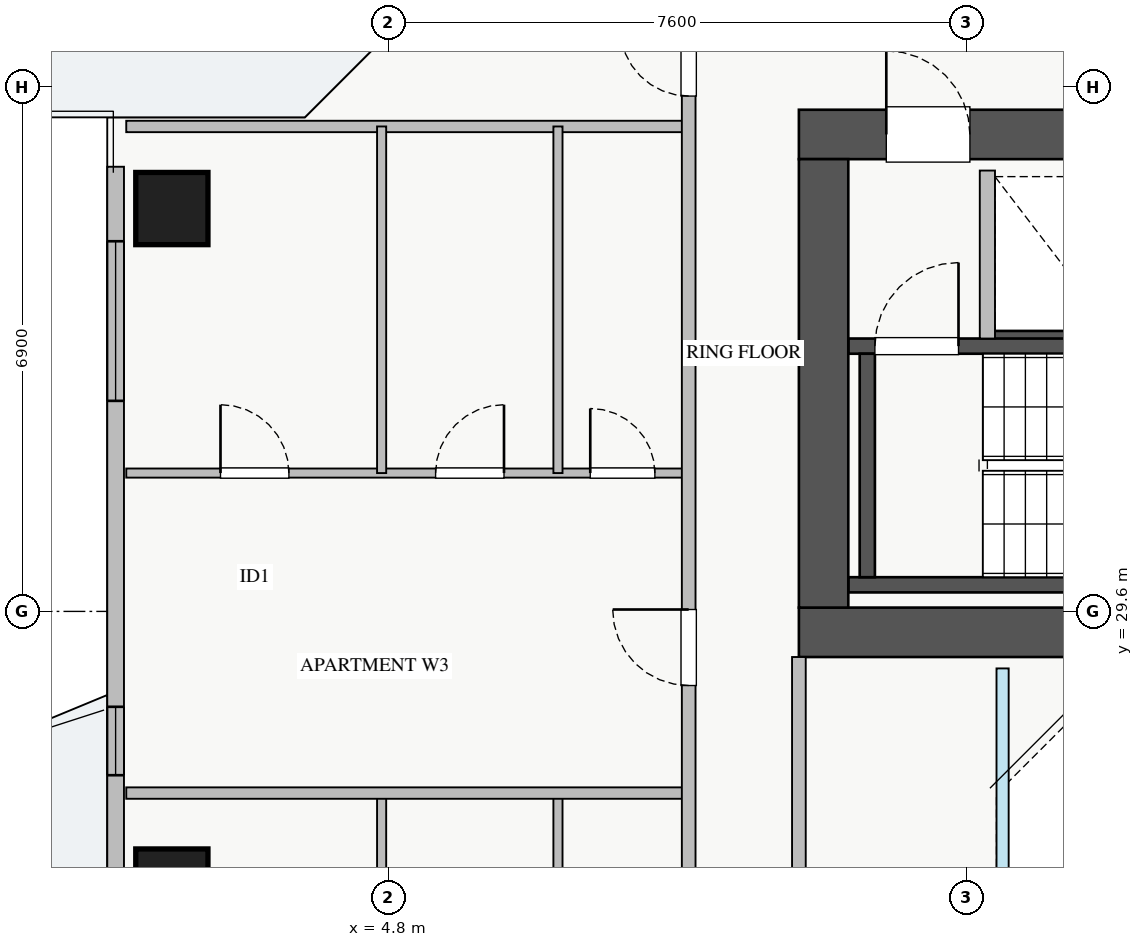
"""IFC4 building model, lengths in metres.
Left out: names, types, materials, properties, quantities, classifications, styles, units other than length and angle.
Written with IfcOpenShell. Run it as: python <this file> out.ifc"""

import sys

from ifc_helpers import new_model, si_unit, direction, frame, frame_2d, origin, origin_2d, place, context, subcontext, project, spatial, rectangle, extrude, source, transform, mapped, element, fill, save


model = new_model("IFC4")
c1 = context("Model", 3, precision=1e-05, world=origin(), true_north=direction((0.0, 1.0)))
c2 = subcontext(c1, "Body", "Model", "MODEL_VIEW")
j1 = project(units=[si_unit("LENGTHUNIT", "METRE"), si_unit("PLANEANGLEUNIT", "RADIAN")], contexts=[c1])
p1 = place(None, origin())
s1 = spatial("IfcSite", under=j1, at=p1, CompositionType="ELEMENT")
p2 = place(p1, origin())
s2 = spatial("IfcBuilding", under=s1, at=p2, CompositionType="ELEMENT")
p3 = place(p2, frame((0.0, 0.0, 143.75)))
s3 = spatial("IfcBuildingStorey", under=s2, at=p3, CompositionType="ELEMENT", Elevation=143.75)
p4 = place(p3, frame((12.68, 33.2, 0.0), z_axis=(0.0, 0.0, 1.0), x_axis=(1.0, 0.0, 0.0)))
e1 = element("IfcWall", 1, at=p4, inside=s3, PredefinedType="SHEAR", context=c2, shape_type="SweptSolid", body=[
    extrude(rectangle(XDim=1.94, YDim=0.18, at=frame_2d((0.97, 0.0))), origin(), (0.0, 0.0, 1.0), 3.07),
])
p5 = place(p3, frame((10.85, 29.95, 0.0), z_axis=(0.0, 0.0, 1.0), x_axis=(1.0, 0.0, 0.0)))
e2 = element("IfcWall", 2, at=p5, inside=s3, PredefinedType="SHEAR", context=c2, shape_type="SweptSolid", body=[
    extrude(rectangle(XDim=7.3, YDim=0.2, at=frame_2d((3.65, 0.0))), origin(), (0.0, 0.0, 1.0), 3.25),
])
p6 = place(p3, frame((10.85, 33.09, 0.0), z_axis=(0.0, 0.0, 1.0), x_axis=(1.0, 0.0, 0.0)))
e3 = element("IfcWall", 3, at=p6, inside=s3, PredefinedType="SHEAR", context=c2, shape_type="SweptSolid", body=[
    extrude(rectangle(XDim=7.3, YDim=0.2, at=frame_2d((3.65, 0.0))), origin(), (0.0, 0.0, 1.0), 3.25),
])
p7 = place(p6, frame((0.35, 0.0, 0.0)))
e4 = element("IfcOpeningElement", 4, at=p7, cuts=e3, PredefinedType="OPENING", context=c2, shape_type="SweptSolid", body=[
    extrude(rectangle(XDim=1.1, YDim=2.05, at=frame_2d((0.55, 1.025))), frame((0.0, 0.11, 0.0), z_axis=(0.0, -1.0, 0.0), x_axis=(1.0, 0.0, 0.0)), (0.0, 0.0, 1.0), 0.22),
])
p8 = place(p3, frame((11.1, 30.05, 0.0), z_axis=(0.0, 0.0, 1.0), x_axis=(0.0, 1.0, 0.0)))
e5 = element("IfcWall", 5, at=p8, inside=s3, PredefinedType="SHEAR", context=c2, shape_type="SweptSolid", body=[
    extrude(rectangle(XDim=2.94, YDim=0.2, at=frame_2d((1.47, 0.0))), origin(), (0.0, 0.0, 1.0), 3.25),
])
p9 = place(p3, frame((10.2, 29.325, 0.0), z_axis=(0.0, 0.0, 1.0), x_axis=(1.0, 0.0, 0.0)))
e6 = element("IfcWall", 6, at=p9, inside=s3, PredefinedType="SHEAR", context=c2, shape_type="SweptSolid", body=[
    extrude(rectangle(XDim=17.6, YDim=0.65, at=frame_2d((8.8, 0.0))), origin(), (0.0, 0.0, 1.0), 3.25),
])
p10 = place(p3, frame((10.2, 35.875, 0.0), z_axis=(0.0, 0.0, 1.0), x_axis=(1.0, 0.0, 0.0)))
e7 = element("IfcWall", 7, at=p10, inside=s3, PredefinedType="SHEAR", context=c2, shape_type="SweptSolid", body=[
    extrude(rectangle(XDim=17.6, YDim=0.65, at=frame_2d((8.8, 0.0))), origin(), (0.0, 0.0, 1.0), 3.25),
])
p11 = place(p10, frame((1.15, 0.0, 0.0)))
e8 = element("IfcOpeningElement", 8, at=p11, cuts=e7, PredefinedType="OPENING", context=c2, shape_type="SweptSolid", body=[
    extrude(rectangle(XDim=1.1, YDim=2.05, at=frame_2d((0.55, 1.025))), frame((0.0, 0.335, 0.0), z_axis=(0.0, -1.0, 0.0), x_axis=(1.0, 0.0, 0.0)), (0.0, 0.0, 1.0), 0.67),
])
p12 = place(p10, frame((8.3, 0.0, 0.0)))
e9 = element("IfcOpeningElement", 9, at=p12, cuts=e7, PredefinedType="OPENING", context=c2, shape_type="SweptSolid", body=[
    extrude(rectangle(XDim=1.1, YDim=2.05, at=frame_2d((0.55, 1.025))), frame((0.0, 0.335, 0.0), z_axis=(0.0, -1.0, 0.0), x_axis=(1.0, 0.0, 0.0)), (0.0, 0.0, 1.0), 0.67),
])
p13 = place(p10, frame((4.9, 0.0, 0.0)))
e10 = element("IfcOpeningElement", 10, at=p13, cuts=e7, PredefinedType="OPENING", context=c2, shape_type="SweptSolid", body=[
    extrude(rectangle(XDim=1.1, YDim=2.05, at=frame_2d((0.55, 1.025))), frame((0.0, 0.335, 0.0), z_axis=(0.0, -1.0, 0.0), x_axis=(1.0, 0.0, 0.0)), (0.0, 0.0, 1.0), 0.67),
])
p14 = place(p10, frame((14.74, 0.0, 0.0)))
e11 = element("IfcOpeningElement", 11, at=p14, cuts=e7, PredefinedType="OPENING", context=c2, shape_type="SweptSolid", body=[
    extrude(rectangle(XDim=1.0, YDim=2.05, at=frame_2d((0.5, 1.025))), frame((0.0, 0.335, 0.0), z_axis=(0.0, -1.0, 0.0), x_axis=(1.0, 0.0, 0.0)), (0.0, 0.0, 1.0), 0.67),
])
p15 = place(p10, frame((10.005, 0.0, 0.0)))
e12 = element("IfcOpeningElement", 12, at=p15, cuts=e7, PredefinedType="OPENING", context=c2, shape_type="SweptSolid", body=[
    extrude(rectangle(XDim=1.0, YDim=2.05, at=frame_2d((0.5, 1.025))), frame((0.0, 0.335, 0.0), z_axis=(0.0, -1.0, 0.0), x_axis=(1.0, 0.0, 0.0)), (0.0, 0.0, 1.0), 0.67),
])
p16 = place(p10, frame((11.55, 0.0, 0.0)))
e13 = element("IfcOpeningElement", 13, at=p16, cuts=e7, PredefinedType="OPENING", context=c2, shape_type="SweptSolid", body=[
    extrude(rectangle(XDim=1.0, YDim=2.05, at=frame_2d((0.5, 1.025))), frame((0.0, 0.335, 0.0), z_axis=(0.0, -1.0, 0.0), x_axis=(1.0, 0.0, 0.0)), (0.0, 0.0, 1.0), 0.67),
])
p17 = place(p10, frame((13.215, 0.0, 0.0)))
e14 = element("IfcOpeningElement", 14, at=p17, cuts=e7, PredefinedType="OPENING", context=c2, shape_type="SweptSolid", body=[
    extrude(rectangle(XDim=1.0, YDim=2.05, at=frame_2d((0.5, 1.025))), frame((0.0, 0.335, 0.0), z_axis=(0.0, -1.0, 0.0), x_axis=(1.0, 0.0, 0.0)), (0.0, 0.0, 1.0), 0.67),
])
p18 = place(p3, frame((10.525, 29.65, 0.0), z_axis=(0.0, 0.0, 1.0), x_axis=(0.0, 1.0, 0.0)))
e15 = element("IfcWall", 15, at=p18, inside=s3, PredefinedType="SHEAR", context=c2, shape_type="SweptSolid", body=[
    extrude(rectangle(XDim=5.9, YDim=0.65, at=frame_2d((2.95, 0.0))), origin(), (0.0, 0.0, 1.0), 3.25),
])
m1 = source(origin(), c2, "Body", "SweptSolid", [
    extrude(rectangle(XDim=0.95, YDim=0.95, at=origin_2d()), origin(), (0.0, 0.0, 1.0), 3.25),
])
for number, where, z_axis, x_axis in (
    (16, (1.95, 34.9, 0.0), (0.0, 0.0, 1.0), (1.0, 0.0, 0.0)),
    (17, (1.95, 26.0, 0.0), (0.0, 0.0, 1.0), (1.0, 0.0, 0.0)),
):
    element("IfcColumn", number, at=place(p3, frame(where, z_axis=z_axis, x_axis=x_axis)), inside=s3, PredefinedType="COLUMN", context=c2, shape_type="MappedRepresentation", body=[
        mapped(m1, transform((0.0, 0.0, 0.0), x_axis=(1.0, 0.0, 0.0), y_axis=(0.0, 1.0, 0.0), z_axis=(0.0, 0.0, 1.0), scale=1.0)),
    ])
p19 = place(p3, frame((1.21, 10.55, 0.0), z_axis=(0.0, 0.0, 1.0), x_axis=(0.0, 1.0, 0.0)))
e18 = element("IfcWall", 18, at=p19, inside=s3, PredefinedType="STANDARD", context=c2, shape_type="SweptSolid", body=[
    extrude(rectangle(XDim=24.9, YDim=0.22, at=frame_2d((12.45, 0.0))), origin(), (0.0, 0.0, 1.0), 2.61),
])
p20 = place(p19, frame((13.3, 0.0, 0.0)))
e19 = element("IfcOpeningElement", 19, at=p20, cuts=e18, PredefinedType="OPENING", context=c2, shape_type="SweptSolid", body=[
    extrude(rectangle(XDim=1.2, YDim=2.1, at=frame_2d((0.6, 1.05))), frame((0.0, 0.12, 0.0), z_axis=(0.0, -1.0, 0.0), x_axis=(1.0, 0.0, 0.0)), (0.0, 0.0, 1.0), 0.24),
])
p21 = place(p19, frame((1.912, 0.0, 0.9)))
e20 = element("IfcOpeningElement", 20, at=p21, cuts=e18, PredefinedType="OPENING", context=c2, shape_type="SweptSolid", body=[
    extrude(rectangle(XDim=2.4, YDim=1.48, at=frame_2d((1.2, 0.74))), frame((0.0, 0.12, 0.0), z_axis=(0.0, -1.0, 0.0), x_axis=(1.0, 0.0, 0.0)), (0.0, 0.0, 1.0), 0.24),
])
p22 = place(p19, frame((21.82, 0.0, 0.9)))
e21 = element("IfcOpeningElement", 21, at=p22, cuts=e18, PredefinedType="OPENING", context=c2, shape_type="SweptSolid", body=[
    extrude(rectangle(XDim=2.1, YDim=1.5, at=frame_2d((1.05, 0.75))), frame((0.0, 0.12, 0.0), z_axis=(0.0, -1.0, 0.0), x_axis=(1.0, 0.0, 0.0)), (0.0, 0.0, 1.0), 0.24),
])
p23 = place(p19, frame((12.05, 0.0, 0.9)))
e22 = element("IfcOpeningElement", 22, at=p23, cuts=e18, PredefinedType="OPENING", context=c2, shape_type="SweptSolid", body=[
    extrude(rectangle(XDim=0.9, YDim=1.2, at=frame_2d((0.45, 0.6))), frame((0.0, 0.12, 0.0), z_axis=(0.0, -1.0, 0.0), x_axis=(1.0, 0.0, 0.0)), (0.0, 0.0, 1.0), 0.24),
])
p24 = place(p19, frame((7.615, 0.0, 0.9)))
e23 = element("IfcOpeningElement", 23, at=p24, cuts=e18, PredefinedType="OPENING", context=c2, shape_type="SweptSolid", body=[
    extrude(rectangle(XDim=0.9, YDim=1.2, at=frame_2d((0.45, 0.6))), frame((0.0, 0.12, 0.0), z_axis=(0.0, -1.0, 0.0), x_axis=(1.0, 0.0, 0.0)), (0.0, 0.0, 1.0), 0.24),
])
p25 = place(p19, frame((16.895, 0.0, 0.9)))
e24 = element("IfcOpeningElement", 24, at=p25, cuts=e18, PredefinedType="OPENING", context=c2, shape_type="SweptSolid", body=[
    extrude(rectangle(XDim=0.9, YDim=1.2, at=frame_2d((0.45, 0.6))), frame((0.0, 0.12, 0.0), z_axis=(0.0, -1.0, 0.0), x_axis=(1.0, 0.0, 0.0)), (0.0, 0.0, 1.0), 0.24),
])
p26 = place(p3, frame((12.68, 33.19, 0.0), z_axis=(0.0, 0.0, 1.0), x_axis=(0.0, 1.0, 0.0)))
e25 = element("IfcWall", 25, at=p26, inside=s3, PredefinedType="PARTITIONING", context=c2, shape_type="SweptSolid", body=[
    extrude(rectangle(XDim=2.21, YDim=0.2, at=frame_2d((1.105, 0.0))), origin(), (0.0, 0.0, 1.0), 3.07),
])
p27 = place(p3, frame((1.35, 35.98, 0.0), z_axis=(0.0, 0.0, 1.0), x_axis=(1.0, 0.0, 0.0)))
e26 = element("IfcWall", 26, at=p27, inside=s3, PredefinedType="PARTITIONING", context=c2, shape_type="SweptSolid", body=[
    extrude(rectangle(XDim=7.4, YDim=0.15, at=frame_2d((3.7, 0.0))), origin(), (0.0, 0.0, 1.0), 3.07),
])
for number, where, z_axis, x_axis in (
    (27, (4.71, 22.38, 0.0), (0.0, 0.0, 1.0), (0.0, 1.0, 0.0)),
    (28, (7.03, 22.38, 0.0), (0.0, 0.0, 1.0), (0.0, 1.0, 0.0)),
):
    element("IfcWall", number, at=place(p3, frame(where, z_axis=z_axis, x_axis=x_axis)), inside=s3, PredefinedType="PLUMBINGWALL", context=c2, shape_type="SweptSolid", body=[
        extrude(rectangle(XDim=4.83, YDim=0.12, at=frame_2d((2.415, 0.0))), origin(), (0.0, 0.0, 1.0), 3.07),
    ])
p28 = place(p3, frame((1.35, 31.42, 0.0), z_axis=(0.0, 0.0, 1.0), x_axis=(1.0, 0.0, 0.0)))
e29 = element("IfcWall", 29, at=p28, inside=s3, PredefinedType="PLUMBINGWALL", context=c2, shape_type="SweptSolid", body=[
    extrude(rectangle(XDim=7.4, YDim=0.12, at=frame_2d((3.7, 0.0))), origin(), (0.0, 0.0, 1.0), 3.07),
])
p29 = place(p28, frame((1.24, 0.0, 0.0)))
e30 = element("IfcOpeningElement", 30, at=p29, cuts=e29, PredefinedType="OPENING", context=c2, shape_type="SweptSolid", body=[
    extrude(rectangle(XDim=0.9, YDim=2.05, at=frame_2d((0.45, 1.025))), frame((0.0, 0.07, 0.0), z_axis=(0.0, -1.0, 0.0), x_axis=(1.0, 0.0, 0.0)), (0.0, 0.0, 1.0), 0.14),
])
p30 = place(p28, frame((4.07, 0.0, 0.0)))
e31 = element("IfcOpeningElement", 31, at=p30, cuts=e29, PredefinedType="OPENING", context=c2, shape_type="SweptSolid", body=[
    extrude(rectangle(XDim=0.9, YDim=2.05, at=frame_2d((0.45, 1.025))), frame((0.0, 0.07, 0.0), z_axis=(0.0, -1.0, 0.0), x_axis=(1.0, 0.0, 0.0)), (0.0, 0.0, 1.0), 0.14),
])
p31 = place(p28, frame((6.105, 0.0, 0.0)))
e32 = element("IfcOpeningElement", 32, at=p31, cuts=e29, PredefinedType="OPENING", context=c2, shape_type="SweptSolid", body=[
    extrude(rectangle(XDim=0.85, YDim=2.05, at=frame_2d((0.425, 1.025))), frame((0.0, 0.07, 0.0), z_axis=(0.0, -1.0, 0.0), x_axis=(1.0, 0.0, 0.0)), (0.0, 0.0, 1.0), 0.14),
])
p32 = place(p3, frame((4.71, 31.42, 0.0), z_axis=(0.0, 0.0, 1.0), x_axis=(0.0, 1.0, 0.0)))
e33 = element("IfcWall", 33, at=p32, inside=s3, PredefinedType="PLUMBINGWALL", context=c2, shape_type="SweptSolid", body=[
    extrude(rectangle(XDim=4.56, YDim=0.12, at=frame_2d((2.28, 0.0))), origin(), (0.0, 0.0, 1.0), 3.07),
])
p33 = place(p3, frame((7.03, 31.42, 0.0), z_axis=(0.0, 0.0, 1.0), x_axis=(0.0, 1.0, 0.0)))
e34 = element("IfcWall", 34, at=p33, inside=s3, PredefinedType="PLUMBINGWALL", context=c2, shape_type="SweptSolid", body=[
    extrude(rectangle(XDim=4.56, YDim=0.12, at=frame_2d((2.28, 0.0))), origin(), (0.0, 0.0, 1.0), 2.577),
])
p34 = place(p3, frame((1.35, 27.21, 0.0), z_axis=(0.0, 0.0, 1.0), x_axis=(1.0, 0.0, 0.0)))
e35 = element("IfcWall", 35, at=p34, inside=s3, PredefinedType="PARTITIONING", context=c2, shape_type="SweptSolid", body=[
    extrude(rectangle(XDim=7.4, YDim=0.15, at=frame_2d((3.7, 0.0))), origin(), (0.0, 0.0, 1.0), 3.07),
])
p35 = place(p3, frame((8.75, 8.3, 0.0), z_axis=(0.0, 0.0, 1.0), x_axis=(0.0, 1.0, 0.0)))
e36 = element("IfcWall", 36, at=p35, inside=s3, PredefinedType="PARTITIONING", context=c2, shape_type="SweptSolid", body=[
    extrude(rectangle(XDim=29.4, YDim=0.18, at=frame_2d((14.7, 0.0))), origin(), (0.0, 0.0, 1.0), 3.07),
])
p36 = place(p35, frame((28.08, 0.0, 0.0)))
e37 = element("IfcOpeningElement", 37, at=p36, cuts=e36, PredefinedType="OPENING", context=c2, shape_type="SweptSolid", body=[
    extrude(rectangle(XDim=0.9, YDim=2.05, at=frame_2d((0.45, 1.025))), frame((0.0, 0.1, 0.0), z_axis=(0.0, -1.0, 0.0), x_axis=(1.0, 0.0, 0.0)), (0.0, 0.0, 1.0), 0.2),
])
p37 = place(p35, frame((0.245, 0.0, 0.0)))
e38 = element("IfcOpeningElement", 38, at=p37, cuts=e36, PredefinedType="OPENING", context=c2, shape_type="SweptSolid", body=[
    extrude(rectangle(XDim=0.9, YDim=2.05, at=frame_2d((0.45, 1.025))), frame((0.0, 0.1, 0.0), z_axis=(0.0, -1.0, 0.0), x_axis=(1.0, 0.0, 0.0)), (0.0, 0.0, 1.0), 0.2),
])
p38 = place(p35, frame((5.0, 0.0, 0.0)))
e39 = element("IfcOpeningElement", 39, at=p38, cuts=e36, PredefinedType="OPENING", context=c2, shape_type="SweptSolid", body=[
    extrude(rectangle(XDim=1.0, YDim=2.05, at=frame_2d((0.5, 1.025))), frame((0.0, 0.1, 0.0), z_axis=(0.0, -1.0, 0.0), x_axis=(1.0, 0.0, 0.0)), (0.0, 0.0, 1.0), 0.2),
])
p39 = place(p35, frame((11.165, 0.0, 0.0)))
e40 = element("IfcOpeningElement", 40, at=p39, cuts=e36, PredefinedType="OPENING", context=c2, shape_type="SweptSolid", body=[
    extrude(rectangle(XDim=1.0, YDim=2.05, at=frame_2d((0.5, 1.025))), frame((0.0, 0.1, 0.0), z_axis=(0.0, -1.0, 0.0), x_axis=(1.0, 0.0, 0.0)), (0.0, 0.0, 1.0), 0.2),
])
p40 = place(p35, frame((20.325, 0.0, 0.0)))
e41 = element("IfcOpeningElement", 41, at=p40, cuts=e36, PredefinedType="OPENING", context=c2, shape_type="SweptSolid", body=[
    extrude(rectangle(XDim=1.0, YDim=2.05, at=frame_2d((0.5, 1.025))), frame((0.0, 0.1, 0.0), z_axis=(0.0, -1.0, 0.0), x_axis=(1.0, 0.0, 0.0)), (0.0, 0.0, 1.0), 0.2),
])
p41 = place(p3, frame((10.2, 17.0, 0.0), z_axis=(0.0, 0.0, 1.0), x_axis=(0.0, 1.0, 0.0)))
e42 = element("IfcWall", 42, at=p41, inside=s3, PredefinedType="PARTITIONING", context=c2, shape_type="SweptSolid", body=[
    extrude(rectangle(XDim=12.0, YDim=0.18, at=frame_2d((6.0, 0.0))), origin(), (0.0, 0.0, 1.0), 3.07),
])
p42 = place(p41, frame((1.5, 0.0, 0.0)))
e43 = element("IfcOpeningElement", 43, at=p42, cuts=e42, PredefinedType="OPENING", context=c2, shape_type="SweptSolid", body=[
    extrude(rectangle(XDim=0.85, YDim=2.05, at=frame_2d((0.425, 1.025))), frame((0.0, 0.1, 0.0), z_axis=(0.0, -1.0, 0.0), x_axis=(1.0, 0.0, 0.0)), (0.0, 0.0, 1.0), 0.2),
])
p43 = place(p41, frame((6.5, 0.0, 0.0)))
e44 = element("IfcOpeningElement", 44, at=p43, cuts=e42, PredefinedType="OPENING", context=c2, shape_type="SweptSolid", body=[
    extrude(rectangle(XDim=1.0, YDim=2.05, at=frame_2d((0.5, 1.025))), frame((0.0, 0.1, 0.0), z_axis=(0.0, -1.0, 0.0), x_axis=(1.0, 0.0, 0.0)), (0.0, 0.0, 1.0), 0.2),
])
m2 = source(origin(), c2, "Body", "SweptSolid", [
    extrude(rectangle(XDim=2.1, YDim=1.5, at=frame_2d((1.05, 0.75))), frame((0.0, 0.03, 0.0), z_axis=(0.0, -1.0, 0.0), x_axis=(1.0, 0.0, 0.0)), (0.0, 0.0, 1.0), 0.06),
])
p44 = place(p22, origin())
e45 = element("IfcWindow", 45, at=p44, inside=s3, PartitioningType="TRIPLE_PANEL_VERTICAL", PredefinedType="WINDOW", context=c2, shape_type="MappedRepresentation", body=[
    mapped(m2, transform((0.0, 0.0, 0.0), x_axis=(1.0, 0.0, 0.0), y_axis=(0.0, 1.0, 0.0), z_axis=(0.0, 0.0, 1.0), scale=1.0)),
])
fill(e21, e45)
m3 = source(origin(), c2, "Body", "SweptSolid", [
    extrude(rectangle(XDim=1.1, YDim=2.05, at=frame_2d((0.55, 1.025))), frame((0.0, 0.025, 0.0), z_axis=(0.0, -1.0, 0.0), x_axis=(1.0, 0.0, 0.0)), (0.0, 0.0, 1.0), 0.05),
])
p45 = place(p11, origin())
e46 = element("IfcDoor", 46, at=p45, inside=s3, OperationType="SINGLE_SWING_LEFT", PredefinedType="DOOR", context=c2, shape_type="MappedRepresentation", body=[
    mapped(m3, transform((0.0, 0.0, 0.0), x_axis=(1.0, 0.0, 0.0), y_axis=(0.0, 1.0, 0.0), z_axis=(0.0, 0.0, 1.0), scale=1.0)),
])
fill(e8, e46)
p46 = place(p7, origin())
e47 = element("IfcDoor", 47, at=p46, inside=s3, OperationType="SINGLE_SWING_RIGHT", PredefinedType="DOOR", context=c2, shape_type="MappedRepresentation", body=[
    mapped(m3, transform((0.0, 0.0, 0.0), x_axis=(1.0, 0.0, 0.0), y_axis=(0.0, 1.0, 0.0), z_axis=(0.0, 0.0, 1.0), scale=1.0)),
])
fill(e4, e47)
m4 = source(origin(), c2, "Body", "SweptSolid", [
    extrude(rectangle(XDim=0.9, YDim=2.05, at=frame_2d((0.45, 1.025))), frame((0.0, 0.025, 0.0), z_axis=(0.0, -1.0, 0.0), x_axis=(1.0, 0.0, 0.0)), (0.0, 0.0, 1.0), 0.05),
])
p47 = place(p29, origin())
e48 = element("IfcDoor", 48, at=p47, inside=s3, OperationType="SINGLE_SWING_LEFT", PredefinedType="DOOR", context=c2, shape_type="MappedRepresentation", body=[
    mapped(m4, transform((0.0, 0.0, 0.0), x_axis=(1.0, 0.0, 0.0), y_axis=(0.0, 1.0, 0.0), z_axis=(0.0, 0.0, 1.0), scale=1.0)),
])
fill(e30, e48)
p48 = place(p30, origin())
e49 = element("IfcDoor", 49, at=p48, inside=s3, OperationType="SINGLE_SWING_RIGHT", PredefinedType="DOOR", context=c2, shape_type="MappedRepresentation", body=[
    mapped(m4, transform((0.0, 0.0, 0.0), x_axis=(1.0, 0.0, 0.0), y_axis=(0.0, 1.0, 0.0), z_axis=(0.0, 0.0, 1.0), scale=1.0)),
])
fill(e31, e49)
m5 = source(origin(), c2, "Body", "SweptSolid", [
    extrude(rectangle(XDim=0.85, YDim=2.05, at=frame_2d((0.425, 1.025))), frame((0.0, 0.025, 0.0), z_axis=(0.0, -1.0, 0.0), x_axis=(1.0, 0.0, 0.0)), (0.0, 0.0, 1.0), 0.05),
])
p49 = place(p31, origin())
e50 = element("IfcDoor", 50, at=p49, inside=s3, OperationType="SINGLE_SWING_LEFT", PredefinedType="DOOR", context=c2, shape_type="MappedRepresentation", body=[
    mapped(m5, transform((0.0, 0.0, 0.0), x_axis=(1.0, 0.0, 0.0), y_axis=(0.0, 1.0, 0.0), z_axis=(0.0, 0.0, 1.0), scale=1.0)),
])
fill(e32, e50)
p50 = place(p36, origin())
e51 = element("IfcDoor", 51, at=p50, inside=s3, OperationType="SINGLE_SWING_RIGHT", PredefinedType="DOOR", context=c2, shape_type="MappedRepresentation", body=[
    mapped(m4, transform((0.0, 0.0, 0.0), x_axis=(1.0, 0.0, 0.0), y_axis=(0.0, 1.0, 0.0), z_axis=(0.0, 0.0, 1.0), scale=1.0)),
])
fill(e37, e51)
m6 = source(origin(), c2, "Body", "SweptSolid", [
    extrude(rectangle(XDim=1.0, YDim=2.05, at=frame_2d((0.5, 1.025))), frame((0.0, 0.025, 0.0), z_axis=(0.0, -1.0, 0.0), x_axis=(1.0, 0.0, 0.0)), (0.0, 0.0, 1.0), 0.05),
])
p51 = place(p40, origin())
e52 = element("IfcDoor", 52, at=p51, inside=s3, OperationType="SINGLE_SWING_RIGHT", PredefinedType="DOOR", context=c2, shape_type="MappedRepresentation", body=[
    mapped(m6, transform((0.0, 0.0, 0.0), x_axis=(1.0, 0.0, 0.0), y_axis=(0.0, 1.0, 0.0), z_axis=(0.0, 0.0, 1.0), scale=1.0)),
])
fill(e41, e52)
m7 = source(origin(), c2, "Body", "SweptSolid", [
    extrude(rectangle(XDim=0.9, YDim=1.2, at=frame_2d((0.45, 0.6))), frame((0.0, 0.03, 0.0), z_axis=(0.0, -1.0, 0.0), x_axis=(1.0, 0.0, 0.0)), (0.0, 0.0, 1.0), 0.06),
])
p52 = place(p25, origin())
e53 = element("IfcWindow", 53, at=p52, inside=s3, PartitioningType="SINGLE_PANEL", PredefinedType="WINDOW", context=c2, shape_type="MappedRepresentation", body=[
    mapped(m7, transform((0.0, 0.0, 0.0), x_axis=(1.0, 0.0, 0.0), y_axis=(0.0, 1.0, 0.0), z_axis=(0.0, 0.0, 1.0), scale=1.0)),
])
fill(e24, e53)
save(model, sys.argv[1])
